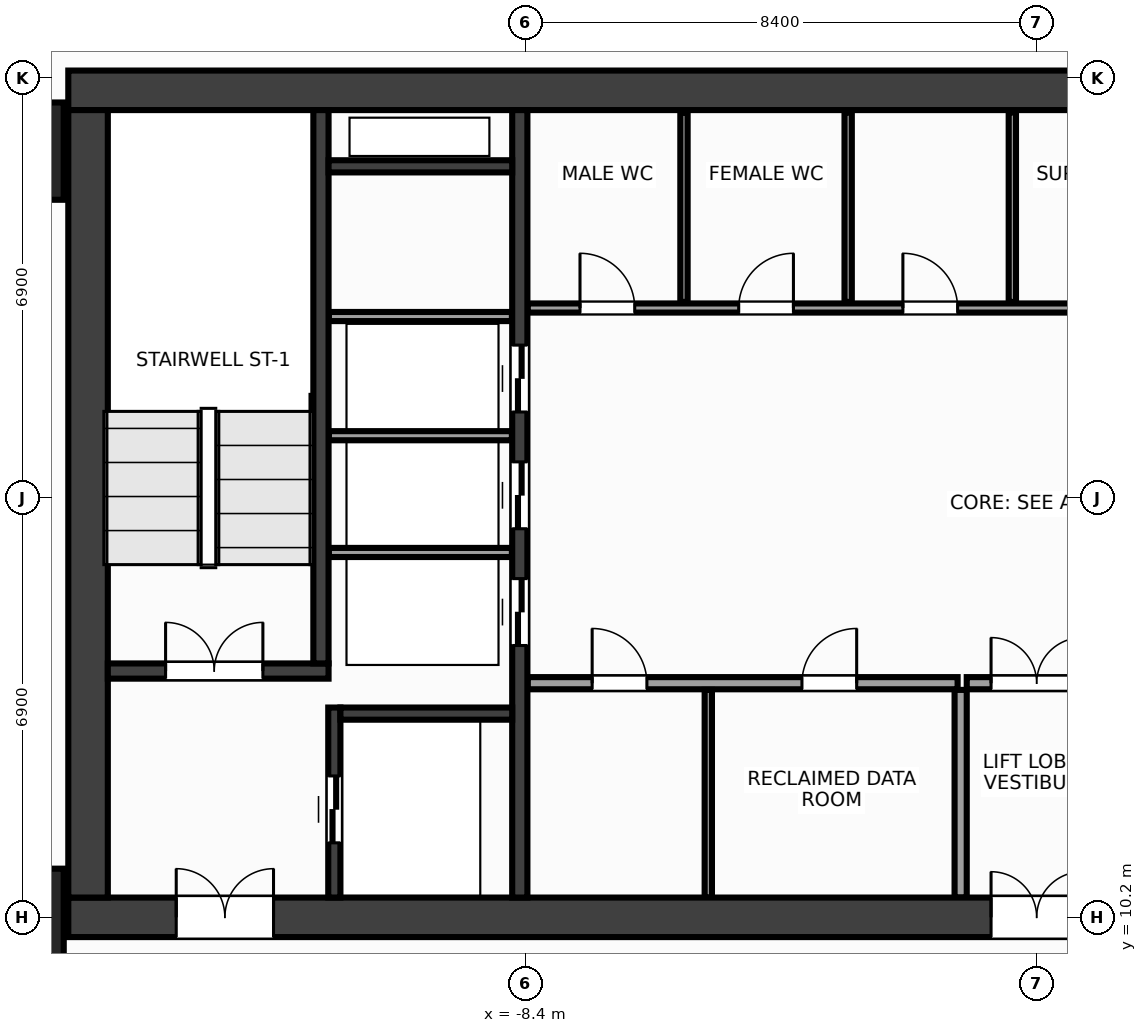
"""IFC4 building model, lengths in metres.
Left out: names, types, materials, properties, quantities, classifications, styles, units other than length and angle.
Written with IfcOpenShell. Run it as: python <this file> out.ifc"""

import sys

from ifc_helpers import new_model, si_unit, direction, frame, frame_2d, origin, origin_2d, place, context, subcontext, project, spatial, rectangle, extrude, source, transform, mapped, element, fill, save


model = new_model("IFC4")
c1 = context("Model", 3, precision=1e-05, world=origin(), true_north=direction((0.0, 1.0)))
c2 = subcontext(c1, "Body", "Model", "MODEL_VIEW")
j1 = project(units=[si_unit("LENGTHUNIT", "METRE"), si_unit("PLANEANGLEUNIT", "RADIAN")], contexts=[c1])
p1 = place(None, origin())
s1 = spatial("IfcSite", under=j1, at=p1, CompositionType="ELEMENT")
p2 = place(p1, origin())
s2 = spatial("IfcBuilding", under=s1, at=p2, CompositionType="ELEMENT")
p3 = place(p2, frame((0.0, 0.0, 142.4)))
s3 = spatial("IfcBuildingStorey", under=s2, at=p3, CompositionType="ELEMENT", Elevation=142.4)
m1 = source(origin(), c2, "Body", "SweptSolid", [
    extrude(rectangle(XDim=31.85, YDim=0.65, at=frame_2d((15.925, 0.0))), origin(), (0.0, 0.0, 1.0), 3.6),
])
p4 = place(p3, frame((-15.925, 23.8, 0.0), z_axis=(0.0, 0.0, 1.0), x_axis=(1.0, 0.0, 0.0)))
e1 = element("IfcWall", 1, at=p4, inside=s3, PredefinedType="SHEAR", context=c2, shape_type="MappedRepresentation", body=[
    mapped(m1, transform((0.0, 0.0, 0.0), x_axis=(1.0, 0.0, 0.0), y_axis=(0.0, 1.0, 0.0), z_axis=(0.0, 0.0, 1.0), scale=1.0)),
])
p5 = place(p3, frame((-15.925, 10.2, 0.0), z_axis=(0.0, 0.0, 1.0), x_axis=(1.0, 0.0, 0.0)))
e2 = element("IfcWall", 2, at=p5, inside=s3, PredefinedType="SHEAR", context=c2, shape_type="MappedRepresentation", body=[
    mapped(m1, transform((0.0, 0.0, 0.0), x_axis=(1.0, 0.0, 0.0), y_axis=(0.0, 1.0, 0.0), z_axis=(0.0, 0.0, 1.0), scale=1.0)),
])
p6 = place(p5, frame((1.775, 0.0, 0.0)))
e3 = element("IfcOpeningElement", 3, at=p6, cuts=e2, PredefinedType="OPENING", context=c2, shape_type="SweptSolid", body=[
    extrude(rectangle(XDim=1.6, YDim=2.15, at=frame_2d((0.8, 1.075))), frame((0.0, 0.337, 0.0), z_axis=(0.0, -1.0, 0.0), x_axis=(1.0, 0.0, 0.0)), (0.0, 0.0, 1.0), 0.674),
])
p7 = place(p5, frame((28.475, 0.0, 0.0)))
e4 = element("IfcOpeningElement", 4, at=p7, cuts=e2, PredefinedType="OPENING", context=c2, shape_type="SweptSolid", body=[
    extrude(rectangle(XDim=1.6, YDim=2.15, at=frame_2d((0.8, 1.075))), frame((0.0, 0.337, 0.0), z_axis=(0.0, -1.0, 0.0), x_axis=(1.0, 0.0, 0.0)), (0.0, 0.0, 1.0), 0.674),
])
p8 = place(p5, frame((15.175, 0.0, 0.0)))
e5 = element("IfcOpeningElement", 5, at=p8, cuts=e2, PredefinedType="OPENING", context=c2, shape_type="SweptSolid", body=[
    extrude(rectangle(XDim=1.5, YDim=2.2, at=frame_2d((0.75, 1.1))), frame((0.0, 0.337, 0.0), z_axis=(0.0, -1.0, 0.0), x_axis=(1.0, 0.0, 0.0)), (0.0, 0.0, 1.0), 0.674),
])
m2 = source(origin(), c2, "Body", "SweptSolid", [
    extrude(rectangle(XDim=12.95, YDim=0.65, at=frame_2d((6.475, 0.0))), origin(), (0.0, 0.0, 1.0), 3.6),
])
p9 = place(p3, frame((-15.6, 10.525, 0.0), z_axis=(0.0, 0.0, 1.0), x_axis=(0.0, 1.0, 0.0)))
e6 = element("IfcWall", 6, at=p9, inside=s3, PredefinedType="SHEAR", context=c2, shape_type="MappedRepresentation", body=[
    mapped(m2, transform((0.0, 0.0, 0.0), x_axis=(1.0, 0.0, 0.0), y_axis=(0.0, 1.0, 0.0), z_axis=(0.0, 0.0, 1.0), scale=1.0)),
])
m3 = source(origin(), c2, "Body", "SweptSolid", [
    extrude(rectangle(XDim=12.95, YDim=0.25, at=frame_2d((6.475, 0.0))), origin(), (0.0, 0.0, 1.0), 3.6),
])
p10 = place(p3, frame((-8.5, 10.525, 0.0), z_axis=(0.0, 0.0, 1.0), x_axis=(0.0, 1.0, 0.0)))
e7 = element("IfcWall", 7, at=p10, inside=s3, PredefinedType="SHEAR", context=c2, shape_type="MappedRepresentation", body=[
    mapped(m3, transform((0.0, 0.0, 0.0), x_axis=(1.0, 0.0, 0.0), y_axis=(0.0, 1.0, 0.0), z_axis=(0.0, 0.0, 1.0), scale=1.0)),
])
p11 = place(p10, frame((4.145, 0.0, 0.0)))
e8 = element("IfcOpeningElement", 8, at=p11, cuts=e7, PredefinedType="OPENING", context=c2, shape_type="SweptSolid", body=[
    extrude(rectangle(XDim=1.1, YDim=2.15, at=frame_2d((0.55, 1.075))), frame((0.0, 0.137, 0.0), z_axis=(0.0, -1.0, 0.0), x_axis=(1.0, 0.0, 0.0)), (0.0, 0.0, 1.0), 0.274),
])
p12 = place(p10, frame((6.065, 0.0, 0.0)))
e9 = element("IfcOpeningElement", 9, at=p12, cuts=e7, PredefinedType="OPENING", context=c2, shape_type="SweptSolid", body=[
    extrude(rectangle(XDim=1.1, YDim=2.15, at=frame_2d((0.55, 1.075))), frame((0.0, 0.137, 0.0), z_axis=(0.0, -1.0, 0.0), x_axis=(1.0, 0.0, 0.0)), (0.0, 0.0, 1.0), 0.274),
])
p13 = place(p10, frame((7.985, 0.0, 0.0)))
e10 = element("IfcOpeningElement", 10, at=p13, cuts=e7, PredefinedType="OPENING", context=c2, shape_type="SweptSolid", body=[
    extrude(rectangle(XDim=1.1, YDim=2.15, at=frame_2d((0.55, 1.075))), frame((0.0, 0.137, 0.0), z_axis=(0.0, -1.0, 0.0), x_axis=(1.0, 0.0, 0.0)), (0.0, 0.0, 1.0), 0.274),
])
m4 = source(origin(), c2, "Body", "SweptSolid", [
    extrude(rectangle(XDim=3.63, YDim=0.25, at=frame_2d((1.815, 0.0))), origin(), (0.0, 0.0, 1.0), 3.6),
])
p14 = place(p3, frame((-15.275, 14.25, 0.0), z_axis=(0.0, 0.0, 1.0), x_axis=(1.0, 0.0, 0.0)))
e11 = element("IfcWall", 11, at=p14, inside=s3, PredefinedType="SHEAR", context=c2, shape_type="MappedRepresentation", body=[
    mapped(m4, transform((0.0, 0.0, 0.0), x_axis=(1.0, 0.0, 0.0), y_axis=(0.0, 1.0, 0.0), z_axis=(0.0, 0.0, 1.0), scale=1.0)),
])
p15 = place(p14, frame((0.95, 0.0, 0.0)))
e12 = element("IfcOpeningElement", 12, at=p15, cuts=e11, PredefinedType="OPENING", context=c2, shape_type="SweptSolid", body=[
    extrude(rectangle(XDim=1.6, YDim=2.15, at=frame_2d((0.8, 1.075))), frame((0.0, 0.137, 0.0), z_axis=(0.0, -1.0, 0.0), x_axis=(1.0, 0.0, 0.0)), (0.0, 0.0, 1.0), 0.274),
])
m5 = source(origin(), c2, "Body", "SweptSolid", [
    extrude(rectangle(XDim=9.1, YDim=0.25, at=frame_2d((4.55, 0.0))), origin(), (0.0, 0.0, 1.0), 3.6),
])
p16 = place(p3, frame((-11.77, 14.375, 0.0), z_axis=(0.0, 0.0, 1.0), x_axis=(0.0, 1.0, 0.0)))
e13 = element("IfcWall", 13, at=p16, inside=s3, PredefinedType="SHEAR", context=c2, shape_type="MappedRepresentation", body=[
    mapped(m5, transform((0.0, 0.0, 0.0), x_axis=(1.0, 0.0, 0.0), y_axis=(0.0, 1.0, 0.0), z_axis=(0.0, 0.0, 1.0), scale=1.0)),
])
m6 = source(origin(), c2, "Body", "SweptSolid", [
    extrude(rectangle(XDim=3.125, YDim=0.2, at=frame_2d((1.562, 0.0))), origin(), (0.0, 0.0, 1.0), 3.6),
])
p17 = place(p3, frame((-11.55, 10.525, 0.0), z_axis=(0.0, 0.0, 1.0), x_axis=(0.0, 1.0, 0.0)))
e14 = element("IfcWall", 14, at=p17, inside=s3, PredefinedType="SHEAR", context=c2, shape_type="MappedRepresentation", body=[
    mapped(m6, transform((0.0, 0.0, 0.0), x_axis=(1.0, 0.0, 0.0), y_axis=(0.0, 1.0, 0.0), z_axis=(0.0, 0.0, 1.0), scale=1.0)),
])
p18 = place(p17, frame((0.9, 0.0, 0.0)))
e15 = element("IfcOpeningElement", 15, at=p18, cuts=e14, PredefinedType="OPENING", context=c2, shape_type="SweptSolid", body=[
    extrude(rectangle(XDim=1.1, YDim=2.15, at=frame_2d((0.55, 1.075))), frame((0.0, 0.112, 0.0), z_axis=(0.0, -1.0, 0.0), x_axis=(1.0, 0.0, 0.0)), (0.0, 0.0, 1.0), 0.224),
])
m7 = source(origin(), c2, "Body", "SweptSolid", [
    extrude(rectangle(XDim=2.825, YDim=0.2, at=frame_2d((1.413, 0.0))), origin(), (0.0, 0.0, 1.0), 3.6),
])
p19 = place(p3, frame((-11.45, 13.55, 0.0), z_axis=(0.0, 0.0, 1.0), x_axis=(1.0, 0.0, 0.0)))
e16 = element("IfcWall", 16, at=p19, inside=s3, PredefinedType="SHEAR", context=c2, shape_type="MappedRepresentation", body=[
    mapped(m7, transform((0.0, 0.0, 0.0), x_axis=(1.0, 0.0, 0.0), y_axis=(0.0, 1.0, 0.0), z_axis=(0.0, 0.0, 1.0), scale=1.0)),
])
m8 = source(origin(), c2, "Body", "SweptSolid", [
    extrude(rectangle(XDim=3.02, YDim=0.2, at=frame_2d((1.51, 0.0))), origin(), (0.0, 0.0, 1.0), 3.6),
])
p20 = place(p3, frame((-11.645, 22.55, 0.0), z_axis=(0.0, 0.0, 1.0), x_axis=(1.0, 0.0, 0.0)))
e17 = element("IfcWall", 17, at=p20, inside=s3, PredefinedType="SHEAR", context=c2, shape_type="MappedRepresentation", body=[
    mapped(m8, transform((0.0, 0.0, 0.0), x_axis=(1.0, 0.0, 0.0), y_axis=(0.0, 1.0, 0.0), z_axis=(0.0, 0.0, 1.0), scale=1.0)),
])
m9 = source(origin(), c2, "Body", "SweptSolid", [
    extrude(rectangle(XDim=1.6, YDim=1.6, at=origin_2d()), origin(), (0.0, 0.0, 1.0), 3.6),
])
for number, where, z_axis, x_axis in (
    (18, (-16.8, 10.2, 0.0), (0.0, 0.0, 1.0), (1.0, 0.0, 0.0)),
    (19, (-16.8, 22.8, 0.0), (0.0, 0.0, 1.0), (1.0, 0.0, 0.0)),
):
    element("IfcColumn", number, at=place(p3, frame(where, z_axis=z_axis, x_axis=x_axis)), inside=s3, PredefinedType="COLUMN", context=c2, shape_type="MappedRepresentation", body=[
        mapped(m9, transform((0.0, 0.0, 0.0), x_axis=(1.0, 0.0, 0.0), y_axis=(0.0, 1.0, 0.0), z_axis=(0.0, 0.0, 1.0), scale=1.0)),
    ])
m10 = source(origin(), c2, "Body", "SweptSolid", [
    extrude(rectangle(XDim=3.01, YDim=0.15, at=frame_2d((1.505, 0.0))), origin(), (0.0, 0.0, 1.0), 3.38),
])
for number, where, z_axis, x_axis in (
    (20, (-11.64, 16.2, 0.0), (0.0, 0.0, 1.0), (1.0, 0.0, 0.0)),
    (21, (-11.64, 18.12, 0.0), (0.0, 0.0, 1.0), (1.0, 0.0, 0.0)),
    (22, (-11.64, 20.08, 0.0), (0.0, 0.0, 1.0), (1.0, 0.0, 0.0)),
):
    element("IfcWall", number, at=place(p3, frame(where, z_axis=z_axis, x_axis=x_axis)), inside=s3, PredefinedType="PARTITIONING", context=c2, shape_type="MappedRepresentation", body=[
        mapped(m10, transform((0.0, 0.0, 0.0), x_axis=(1.0, 0.0, 0.0), y_axis=(0.0, 1.0, 0.0), z_axis=(0.0, 0.0, 1.0), scale=1.0)),
    ])
m11 = source(origin(), c2, "Body", "SweptSolid", [
    extrude(rectangle(XDim=7.07, YDim=0.2, at=frame_2d((3.535, 0.0))), origin(), (0.0, 0.0, 1.0), 3.38),
])
p21 = place(p3, frame((-8.37, 14.05, 0.0), z_axis=(0.0, 0.0, 1.0), x_axis=(1.0, 0.0, 0.0)))
e23 = element("IfcWall", 23, at=p21, inside=s3, PredefinedType="PARTITIONING", context=c2, shape_type="MappedRepresentation", body=[
    mapped(m11, transform((0.0, 0.0, 0.0), x_axis=(1.0, 0.0, 0.0), y_axis=(0.0, 1.0, 0.0), z_axis=(0.0, 0.0, 1.0), scale=1.0)),
])
p22 = place(p21, frame((1.06, 0.0, 0.0)))
e24 = element("IfcOpeningElement", 24, at=p22, cuts=e23, PredefinedType="OPENING", context=c2, shape_type="SweptSolid", body=[
    extrude(rectangle(XDim=0.9, YDim=2.15, at=frame_2d((0.45, 1.075))), frame((0.0, 0.112, 0.0), z_axis=(0.0, -1.0, 0.0), x_axis=(1.0, 0.0, 0.0)), (0.0, 0.0, 1.0), 0.224),
])
p23 = place(p21, frame((4.51, 0.0, 0.0)))
e25 = element("IfcOpeningElement", 25, at=p23, cuts=e23, PredefinedType="OPENING", context=c2, shape_type="SweptSolid", body=[
    extrude(rectangle(XDim=0.9, YDim=2.15, at=frame_2d((0.45, 1.075))), frame((0.0, 0.112, 0.0), z_axis=(0.0, -1.0, 0.0), x_axis=(1.0, 0.0, 0.0)), (0.0, 0.0, 1.0), 0.224),
])
m12 = source(origin(), c2, "Body", "SweptSolid", [
    extrude(rectangle(XDim=3.415, YDim=0.2, at=frame_2d((1.708, 0.0))), origin(), (0.0, 0.0, 1.0), 3.38),
])
p24 = place(p3, frame((-1.25, 10.525, 0.0), z_axis=(0.0, 0.0, 1.0), x_axis=(0.0, 1.0, 0.0)))
e26 = element("IfcWall", 26, at=p24, inside=s3, PredefinedType="PARTITIONING", context=c2, shape_type="MappedRepresentation", body=[
    mapped(m12, transform((0.0, 0.0, 0.0), x_axis=(1.0, 0.0, 0.0), y_axis=(0.0, 1.0, 0.0), z_axis=(0.0, 0.0, 1.0), scale=1.0)),
])
m13 = source(origin(), c2, "Body", "SweptSolid", [
    extrude(rectangle(XDim=2.3, YDim=0.2, at=frame_2d((1.15, 0.0))), origin(), (0.0, 0.0, 1.0), 3.38),
])
p25 = place(p3, frame((-1.15, 14.05, 0.0), z_axis=(0.0, 0.0, 1.0), x_axis=(1.0, 0.0, 0.0)))
e27 = element("IfcWall", 27, at=p25, inside=s3, PredefinedType="PARTITIONING", context=c2, shape_type="MappedRepresentation", body=[
    mapped(m13, transform((0.0, 0.0, 0.0), x_axis=(1.0, 0.0, 0.0), y_axis=(0.0, 1.0, 0.0), z_axis=(0.0, 0.0, 1.0), scale=1.0)),
])
p26 = place(p25, frame((0.4, 0.0, 0.0)))
e28 = element("IfcOpeningElement", 28, at=p26, cuts=e27, PredefinedType="OPENING", context=c2, shape_type="SweptSolid", body=[
    extrude(rectangle(XDim=1.5, YDim=2.2, at=frame_2d((0.75, 1.1))), frame((0.0, 0.112, 0.0), z_axis=(0.0, -1.0, 0.0), x_axis=(1.0, 0.0, 0.0)), (0.0, 0.0, 1.0), 0.224),
])
m14 = source(origin(), c2, "Body", "SweptSolid", [
    extrude(rectangle(XDim=14.59, YDim=0.15, at=frame_2d((7.295, 0.0))), origin(), (0.0, 0.0, 1.0), 3.38),
])
p27 = place(p3, frame((-8.37, 20.22, 0.0), z_axis=(0.0, 0.0, 1.0), x_axis=(1.0, 0.0, 0.0)))
e29 = element("IfcWall", 29, at=p27, inside=s3, PredefinedType="PARTITIONING", context=c2, shape_type="MappedRepresentation", body=[
    mapped(m14, transform((0.0, 0.0, 0.0), x_axis=(1.0, 0.0, 0.0), y_axis=(0.0, 1.0, 0.0), z_axis=(0.0, 0.0, 1.0), scale=1.0)),
])
p28 = place(p27, frame((0.86, 0.0, 0.0)))
e30 = element("IfcOpeningElement", 30, at=p28, cuts=e29, PredefinedType="OPENING", context=c2, shape_type="SweptSolid", body=[
    extrude(rectangle(XDim=0.9, YDim=2.15, at=frame_2d((0.45, 1.075))), frame((0.0, 0.087, 0.0), z_axis=(0.0, -1.0, 0.0), x_axis=(1.0, 0.0, 0.0)), (0.0, 0.0, 1.0), 0.174),
])
p29 = place(p27, frame((3.47, 0.0, 0.0)))
e31 = element("IfcOpeningElement", 31, at=p29, cuts=e29, PredefinedType="OPENING", context=c2, shape_type="SweptSolid", body=[
    extrude(rectangle(XDim=0.9, YDim=2.15, at=frame_2d((0.45, 1.075))), frame((0.0, 0.087, 0.0), z_axis=(0.0, -1.0, 0.0), x_axis=(1.0, 0.0, 0.0)), (0.0, 0.0, 1.0), 0.174),
])
p30 = place(p27, frame((6.17, 0.0, 0.0)))
e32 = element("IfcOpeningElement", 32, at=p30, cuts=e29, PredefinedType="OPENING", context=c2, shape_type="SweptSolid", body=[
    extrude(rectangle(XDim=0.9, YDim=2.15, at=frame_2d((0.45, 1.075))), frame((0.0, 0.087, 0.0), z_axis=(0.0, -1.0, 0.0), x_axis=(1.0, 0.0, 0.0)), (0.0, 0.0, 1.0), 0.174),
])
p31 = place(p27, frame((9.07, 0.0, 0.0)))
e33 = element("IfcOpeningElement", 33, at=p31, cuts=e29, PredefinedType="OPENING", context=c2, shape_type="SweptSolid", body=[
    extrude(rectangle(XDim=0.9, YDim=2.15, at=frame_2d((0.45, 1.075))), frame((0.0, 0.087, 0.0), z_axis=(0.0, -1.0, 0.0), x_axis=(1.0, 0.0, 0.0)), (0.0, 0.0, 1.0), 0.174),
])
p32 = place(p27, frame((12.32, 0.0, 0.0)))
e34 = element("IfcOpeningElement", 34, at=p32, cuts=e29, PredefinedType="OPENING", context=c2, shape_type="SweptSolid", body=[
    extrude(rectangle(XDim=0.9, YDim=2.15, at=frame_2d((0.45, 1.075))), frame((0.0, 0.087, 0.0), z_axis=(0.0, -1.0, 0.0), x_axis=(1.0, 0.0, 0.0)), (0.0, 0.0, 1.0), 0.174),
])
m15 = source(origin(), c2, "Body", "SweptSolid", [
    extrude(rectangle(XDim=3.415, YDim=0.12, at=frame_2d((1.708, 0.0))), origin(), (0.0, 0.0, 1.0), 3.38),
])
p33 = place(p3, frame((-5.4, 10.525, 0.0), z_axis=(0.0, 0.0, 1.0), x_axis=(0.0, 1.0, 0.0)))
e35 = element("IfcWall", 35, at=p33, inside=s3, PredefinedType="PARTITIONING", context=c2, shape_type="MappedRepresentation", body=[
    mapped(m15, transform((0.0, 0.0, 0.0), x_axis=(1.0, 0.0, 0.0), y_axis=(0.0, 1.0, 0.0), z_axis=(0.0, 0.0, 1.0), scale=1.0)),
])
m16 = source(origin(), c2, "Body", "SweptSolid", [
    extrude(rectangle(XDim=3.115, YDim=0.12, at=frame_2d((1.558, 0.0))), origin(), (0.0, 0.0, 1.0), 3.38),
])
for number, where, z_axis, x_axis in (
    (36, (-5.8, 20.32, 0.0), (0.0, 0.0, 1.0), (0.0, 1.0, 0.0)),
    (37, (-3.1, 20.32, 0.0), (0.0, 0.0, 1.0), (0.0, 1.0, 0.0)),
    (38, (-0.4, 20.32, 0.0), (0.0, 0.0, 1.0), (0.0, 1.0, 0.0)),
):
    element("IfcWall", number, at=place(p3, frame(where, z_axis=z_axis, x_axis=x_axis)), inside=s3, PredefinedType="PARTITIONING", context=c2, shape_type="MappedRepresentation", body=[
        mapped(m16, transform((0.0, 0.0, 0.0), x_axis=(1.0, 0.0, 0.0), y_axis=(0.0, 1.0, 0.0), z_axis=(0.0, 0.0, 1.0), scale=1.0)),
    ])
m17 = source(origin(), c2, "Body", "SweptSolid", [
    extrude(rectangle(XDim=1.6, YDim=2.15, at=frame_2d((0.8, 1.075))), frame((0.0, 0.025, 0.0), z_axis=(0.0, -1.0, 0.0), x_axis=(1.0, 0.0, 0.0)), (0.0, 0.0, 1.0), 0.05),
])
p34 = place(p15, origin())
e39 = element("IfcDoor", 39, at=p34, inside=s3, OperationType="DOUBLE_DOOR_SINGLE_SWING", PredefinedType="DOOR", context=c2, shape_type="MappedRepresentation", body=[
    mapped(m17, transform((0.0, 0.0, 0.0), x_axis=(1.0, 0.0, 0.0), y_axis=(0.0, 1.0, 0.0), z_axis=(0.0, 0.0, 1.0), scale=1.0)),
])
fill(e12, e39)
p35 = place(p6, origin())
e40 = element("IfcDoor", 40, at=p35, inside=s3, OperationType="DOUBLE_DOOR_SINGLE_SWING", PredefinedType="DOOR", context=c2, shape_type="MappedRepresentation", body=[
    mapped(m17, transform((0.0, 0.0, 0.0), x_axis=(1.0, 0.0, 0.0), y_axis=(0.0, 1.0, 0.0), z_axis=(0.0, 0.0, 1.0), scale=1.0)),
])
fill(e3, e40)
m18 = source(origin(), c2, "Body", "SweptSolid", [
    extrude(rectangle(XDim=1.1, YDim=2.15, at=frame_2d((0.55, 1.075))), frame((0.0, 0.025, 0.0), z_axis=(0.0, -1.0, 0.0), x_axis=(1.0, 0.0, 0.0)), (0.0, 0.0, 1.0), 0.05),
])
p36 = place(p18, origin())
e41 = element("IfcDoor", 41, at=p36, inside=s3, OperationType="DOUBLE_DOOR_SLIDING", PredefinedType="DOOR", context=c2, shape_type="MappedRepresentation", body=[
    mapped(m18, transform((0.0, 0.0, 0.0), x_axis=(1.0, 0.0, 0.0), y_axis=(0.0, 1.0, 0.0), z_axis=(0.0, 0.0, 1.0), scale=1.0)),
])
fill(e15, e41)
p37 = place(p11, origin())
e42 = element("IfcDoor", 42, at=p37, inside=s3, OperationType="DOUBLE_DOOR_SLIDING", PredefinedType="DOOR", context=c2, shape_type="MappedRepresentation", body=[
    mapped(m18, transform((0.0, 0.0, 0.0), x_axis=(1.0, 0.0, 0.0), y_axis=(0.0, 1.0, 0.0), z_axis=(0.0, 0.0, 1.0), scale=1.0)),
])
fill(e8, e42)
p38 = place(p12, origin())
e43 = element("IfcDoor", 43, at=p38, inside=s3, OperationType="DOUBLE_DOOR_SLIDING", PredefinedType="DOOR", context=c2, shape_type="MappedRepresentation", body=[
    mapped(m18, transform((0.0, 0.0, 0.0), x_axis=(1.0, 0.0, 0.0), y_axis=(0.0, 1.0, 0.0), z_axis=(0.0, 0.0, 1.0), scale=1.0)),
])
fill(e9, e43)
p39 = place(p13, origin())
e44 = element("IfcDoor", 44, at=p39, inside=s3, OperationType="DOUBLE_DOOR_SLIDING", PredefinedType="DOOR", context=c2, shape_type="MappedRepresentation", body=[
    mapped(m18, transform((0.0, 0.0, 0.0), x_axis=(1.0, 0.0, 0.0), y_axis=(0.0, 1.0, 0.0), z_axis=(0.0, 0.0, 1.0), scale=1.0)),
])
fill(e10, e44)
m19 = source(origin(), c2, "Body", "SweptSolid", [
    extrude(rectangle(XDim=0.9, YDim=2.15, at=frame_2d((0.45, 1.075))), frame((0.0, 0.025, 0.0), z_axis=(0.0, -1.0, 0.0), x_axis=(1.0, 0.0, 0.0)), (0.0, 0.0, 1.0), 0.05),
])
p40 = place(p22, origin())
e45 = element("IfcDoor", 45, at=p40, inside=s3, OperationType="SINGLE_SWING_LEFT", PredefinedType="DOOR", context=c2, shape_type="MappedRepresentation", body=[
    mapped(m19, transform((0.0, 0.0, 0.0), x_axis=(1.0, 0.0, 0.0), y_axis=(0.0, 1.0, 0.0), z_axis=(0.0, 0.0, 1.0), scale=1.0)),
])
fill(e24, e45)
p41 = place(p23, origin())
e46 = element("IfcDoor", 46, at=p41, inside=s3, OperationType="SINGLE_SWING_RIGHT", PredefinedType="DOOR", context=c2, shape_type="MappedRepresentation", body=[
    mapped(m19, transform((0.0, 0.0, 0.0), x_axis=(1.0, 0.0, 0.0), y_axis=(0.0, 1.0, 0.0), z_axis=(0.0, 0.0, 1.0), scale=1.0)),
])
fill(e25, e46)
m20 = source(origin(), c2, "Body", "SweptSolid", [
    extrude(rectangle(XDim=1.5, YDim=2.2, at=frame_2d((0.75, 1.1))), frame((0.0, 0.025, 0.0), z_axis=(0.0, -1.0, 0.0), x_axis=(1.0, 0.0, 0.0)), (0.0, 0.0, 1.0), 0.05),
])
p42 = place(p26, origin())
e47 = element("IfcDoor", 47, at=p42, inside=s3, OperationType="DOUBLE_DOOR_SINGLE_SWING", PredefinedType="DOOR", context=c2, shape_type="MappedRepresentation", body=[
    mapped(m20, transform((0.0, 0.0, 0.0), x_axis=(1.0, 0.0, 0.0), y_axis=(0.0, 1.0, 0.0), z_axis=(0.0, 0.0, 1.0), scale=1.0)),
])
fill(e28, e47)
p43 = place(p8, origin())
e48 = element("IfcDoor", 48, at=p43, inside=s3, OperationType="DOUBLE_DOOR_SINGLE_SWING", PredefinedType="DOOR", context=c2, shape_type="MappedRepresentation", body=[
    mapped(m20, transform((0.0, 0.0, 0.0), x_axis=(1.0, 0.0, 0.0), y_axis=(0.0, 1.0, 0.0), z_axis=(0.0, 0.0, 1.0), scale=1.0)),
])
fill(e5, e48)
p44 = place(p28, origin())
e49 = element("IfcDoor", 49, at=p44, inside=s3, OperationType="SINGLE_SWING_LEFT", PredefinedType="DOOR", context=c2, shape_type="MappedRepresentation", body=[
    mapped(m19, transform((0.0, 0.0, 0.0), x_axis=(1.0, 0.0, 0.0), y_axis=(0.0, 1.0, 0.0), z_axis=(0.0, 0.0, 1.0), scale=1.0)),
])
fill(e30, e49)
p45 = place(p29, origin())
e50 = element("IfcDoor", 50, at=p45, inside=s3, OperationType="SINGLE_SWING_RIGHT", PredefinedType="DOOR", context=c2, shape_type="MappedRepresentation", body=[
    mapped(m19, transform((0.0, 0.0, 0.0), x_axis=(1.0, 0.0, 0.0), y_axis=(0.0, 1.0, 0.0), z_axis=(0.0, 0.0, 1.0), scale=1.0)),
])
fill(e31, e50)
p46 = place(p30, origin())
e51 = element("IfcDoor", 51, at=p46, inside=s3, OperationType="SINGLE_SWING_LEFT", PredefinedType="DOOR", context=c2, shape_type="MappedRepresentation", body=[
    mapped(m19, transform((0.0, 0.0, 0.0), x_axis=(1.0, 0.0, 0.0), y_axis=(0.0, 1.0, 0.0), z_axis=(0.0, 0.0, 1.0), scale=1.0)),
])
fill(e32, e51)
save(model, sys.argv[1])
